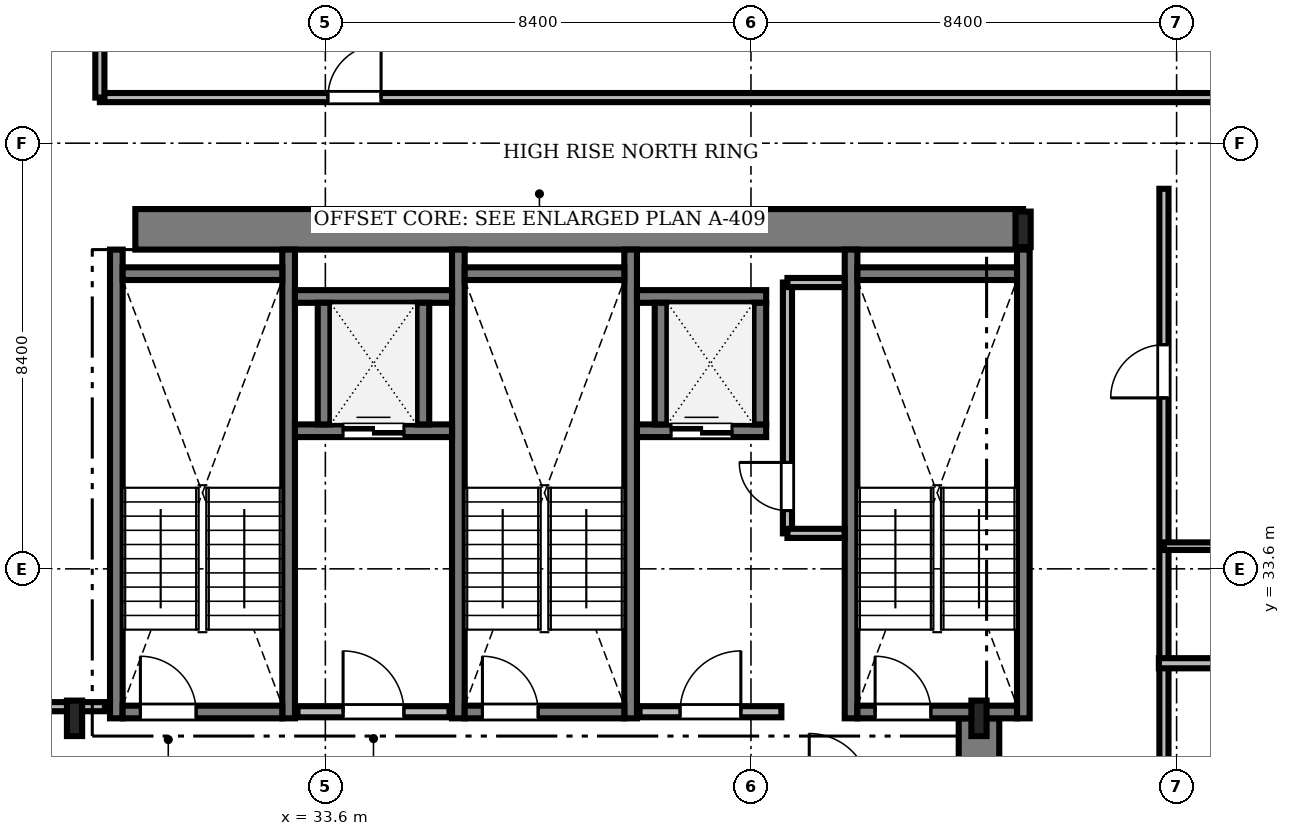
"""IFC4 building model, lengths in metres.
Left out: names, types, materials, properties, quantities, classifications, styles, units other than length and angle.
Written with IfcOpenShell. Run it as: python <this file> out.ifc"""

import sys

from ifc_helpers import new_model, si_unit, direction, frame, frame_2d, origin, origin_2d, place, context, subcontext, project, spatial, rectangle, i_section, extrude, source, transform, mapped, element, fill, save


model = new_model("IFC4")
c1 = context("Model", 3, precision=1e-05, world=origin(), true_north=direction((0.0, 1.0)))
c2 = subcontext(c1, "Body", "Model", "MODEL_VIEW")
j1 = project(units=[si_unit("LENGTHUNIT", "METRE"), si_unit("PLANEANGLEUNIT", "RADIAN")], contexts=[c1])
p1 = place(None, origin())
s1 = spatial("IfcSite", under=j1, at=p1, CompositionType="ELEMENT")
p2 = place(p1, origin())
s2 = spatial("IfcBuilding", under=s1, at=p2, CompositionType="ELEMENT")
p3 = place(p2, frame((0.0, 0.0, 203.55)))
s3 = spatial("IfcBuildingStorey", under=s2, at=p3, CompositionType="ELEMENT", Elevation=203.55)
m1 = source(origin(), c2, "Body", "SweptSolid", [
    extrude(rectangle(XDim=17.52, YDim=0.8, at=frame_2d((8.76, 0.0))), origin(), (0.0, 0.0, 1.0), 3.53),
])
p4 = place(p3, frame((29.85, 40.3, 0.0), z_axis=(0.0, 0.0, 1.0), x_axis=(1.0, 0.0, 0.0)))
e1 = element("IfcWall", 1, at=p4, inside=s3, PredefinedType="SHEAR", context=c2, shape_type="MappedRepresentation", body=[
    mapped(m1, transform((0.0, 0.0, 0.0), scale=1.0)),
])
m2 = source(origin(), c2, "Body", "SweptSolid", [
    extrude(rectangle(XDim=13.15, YDim=0.8, at=frame_2d((6.575, 0.0))), origin(), (0.0, 0.0, 1.0), 3.53),
])
p5 = place(p3, frame((46.5, 17.5, 0.0), z_axis=(0.0, 0.0, 1.0), x_axis=(0.0, 1.0, 0.0)))
e2 = element("IfcWall", 2, at=p5, inside=s3, PredefinedType="SHEAR", context=c2, shape_type="MappedRepresentation", body=[
    mapped(m2, transform((0.0, 0.0, 0.0), scale=1.0)),
])
m3 = source(origin(), c2, "Body", "SweptSolid", [
    extrude(i_section(OverallWidth=0.3, OverallDepth=0.7, WebThickness=0.017, FlangeThickness=0.032, FilletRadius=0.027, at=origin_2d()), origin(), (0.0, 0.0, 1.0), 3.53),
])
for number, where, z_axis, x_axis in (
    (3, (28.65, 30.65, 0.0), (0.0, 0.0, 1.0), (1.0, 0.0, 0.0)),
    (4, (46.5, 30.65, 0.0), (0.0, 0.0, 1.0), (1.0, 0.0, 0.0)),
    (5, (47.37, 40.3, 0.0), (0.0, 0.0, 1.0), (1.0, 0.0, 0.0)),
):
    element("IfcColumn", number, at=place(p3, frame(where, z_axis=z_axis, x_axis=x_axis)), inside=s3, PredefinedType="COLUMN", context=c2, shape_type="MappedRepresentation", body=[
        mapped(m3, transform((0.0, 0.0, 0.0), scale=1.0)),
    ])
m4 = source(origin(), c2, "Body", "SweptSolid", [
    extrude(rectangle(XDim=9.25, YDim=0.25, at=frame_2d((4.625, 0.0))), origin(), (0.0, 0.0, 1.0), 3.55),
])
for number, where, z_axis, x_axis in (
    (6, (29.475, 30.65, 0.0), (0.0, 0.0, 1.0), (0.0, 1.0, 0.0)),
    (7, (32.875, 30.65, 0.0), (0.0, 0.0, 1.0), (0.0, 1.0, 0.0)),
):
    element("IfcWall", number, at=place(p3, frame(where, z_axis=z_axis, x_axis=x_axis)), inside=s3, PredefinedType="SOLIDWALL", context=c2, shape_type="MappedRepresentation", body=[
        mapped(m4, transform((0.0, 0.0, 0.0), scale=1.0)),
    ])
m5 = source(origin(), c2, "Body", "SweptSolid", [
    extrude(rectangle(XDim=3.15, YDim=0.25, at=frame_2d((1.575, 0.0))), origin(), (0.0, 0.0, 1.0), 3.55),
])
p6 = place(p3, frame((29.6, 39.425, 0.0), z_axis=(0.0, 0.0, 1.0), x_axis=(1.0, 0.0, 0.0)))
e8 = element("IfcWall", 8, at=p6, inside=s3, PredefinedType="SOLIDWALL", context=c2, shape_type="MappedRepresentation", body=[
    mapped(m5, transform((0.0, 0.0, 0.0), scale=1.0)),
])
p7 = place(p3, frame((29.6, 30.775, 0.0), z_axis=(0.0, 0.0, 1.0), x_axis=(1.0, 0.0, 0.0)))
e9 = element("IfcWall", 9, at=p7, inside=s3, PredefinedType="SOLIDWALL", context=c2, shape_type="MappedRepresentation", body=[
    mapped(m5, transform((0.0, 0.0, 0.0), scale=1.0)),
])
m6 = source(origin(), c2, "Body", "SweptSolid", [
    extrude(rectangle(XDim=1.1, YDim=2.2, at=frame_2d((0.55, 1.1))), frame((0.0, 0.135, 0.0), z_axis=(0.0, -1.0, 0.0), x_axis=(1.0, 0.0, 0.0)), (0.0, 0.0, 1.0), 0.27),
])
p8 = place(p7, frame((0.35, 0.0, 0.0)))
e10 = element("IfcOpeningElement", 10, at=p8, cuts=e9, PredefinedType="OPENING", context=c2, shape_type="MappedRepresentation", body=[
    mapped(m6, transform((0.0, 0.0, 0.0), scale=1.0)),
])
for number, where, z_axis, x_axis in (
    (11, (36.225, 30.65, 0.0), (0.0, 0.0, 1.0), (0.0, 1.0, 0.0)),
    (12, (39.625, 30.65, 0.0), (0.0, 0.0, 1.0), (0.0, 1.0, 0.0)),
):
    element("IfcWall", number, at=place(p3, frame(where, z_axis=z_axis, x_axis=x_axis)), inside=s3, PredefinedType="SOLIDWALL", context=c2, shape_type="MappedRepresentation", body=[
        mapped(m4, transform((0.0, 0.0, 0.0), scale=1.0)),
    ])
p9 = place(p3, frame((36.35, 39.425, 0.0), z_axis=(0.0, 0.0, 1.0), x_axis=(1.0, 0.0, 0.0)))
e13 = element("IfcWall", 13, at=p9, inside=s3, PredefinedType="SOLIDWALL", context=c2, shape_type="MappedRepresentation", body=[
    mapped(m5, transform((0.0, 0.0, 0.0), scale=1.0)),
])
p10 = place(p3, frame((36.35, 30.775, 0.0), z_axis=(0.0, 0.0, 1.0), x_axis=(1.0, 0.0, 0.0)))
e14 = element("IfcWall", 14, at=p10, inside=s3, PredefinedType="SOLIDWALL", context=c2, shape_type="MappedRepresentation", body=[
    mapped(m5, transform((0.0, 0.0, 0.0), scale=1.0)),
])
p11 = place(p10, frame((0.35, 0.0, 0.0)))
e15 = element("IfcOpeningElement", 15, at=p11, cuts=e14, PredefinedType="OPENING", context=c2, shape_type="MappedRepresentation", body=[
    mapped(m6, transform((0.0, 0.0, 0.0), scale=1.0)),
])
for number, where, z_axis, x_axis in (
    (16, (43.975, 30.65, 0.0), (0.0, 0.0, 1.0), (0.0, 1.0, 0.0)),
    (17, (47.375, 30.65, 0.0), (0.0, 0.0, 1.0), (0.0, 1.0, 0.0)),
):
    element("IfcWall", number, at=place(p3, frame(where, z_axis=z_axis, x_axis=x_axis)), inside=s3, PredefinedType="SOLIDWALL", context=c2, shape_type="MappedRepresentation", body=[
        mapped(m4, transform((0.0, 0.0, 0.0), scale=1.0)),
    ])
p12 = place(p3, frame((44.1, 39.425, 0.0), z_axis=(0.0, 0.0, 1.0), x_axis=(1.0, 0.0, 0.0)))
e18 = element("IfcWall", 18, at=p12, inside=s3, PredefinedType="SOLIDWALL", context=c2, shape_type="MappedRepresentation", body=[
    mapped(m5, transform((0.0, 0.0, 0.0), scale=1.0)),
])
p13 = place(p3, frame((44.1, 30.775, 0.0), z_axis=(0.0, 0.0, 1.0), x_axis=(1.0, 0.0, 0.0)))
e19 = element("IfcWall", 19, at=p13, inside=s3, PredefinedType="SOLIDWALL", context=c2, shape_type="MappedRepresentation", body=[
    mapped(m5, transform((0.0, 0.0, 0.0), scale=1.0)),
])
p14 = place(p13, frame((0.35, 0.0, 0.0)))
e20 = element("IfcOpeningElement", 20, at=p14, cuts=e19, PredefinedType="OPENING", context=c2, shape_type="MappedRepresentation", body=[
    mapped(m6, transform((0.0, 0.0, 0.0), scale=1.0)),
])
m7 = source(origin(), c2, "Body", "SweptSolid", [
    extrude(rectangle(XDim=3.0, YDim=0.22, at=frame_2d((1.5, 0.0))), origin(), (0.0, 0.0, 1.0), 3.53),
])
p15 = place(p3, frame((33.05, 30.78, 0.0), z_axis=(0.0, 0.0, 1.0), x_axis=(1.0, 0.0, 0.0)))
e21 = element("IfcWall", 21, at=p15, inside=s3, PredefinedType="SOLIDWALL", context=c2, shape_type="MappedRepresentation", body=[
    mapped(m7, transform((0.0, 0.0, 0.0), scale=1.0)),
])
m8 = source(origin(), c2, "Body", "SweptSolid", [
    extrude(rectangle(XDim=1.2, YDim=2.2, at=frame_2d((0.6, 1.1))), frame((0.0, 0.12, 0.0), z_axis=(0.0, -1.0, 0.0), x_axis=(1.0, 0.0, 0.0)), (0.0, 0.0, 1.0), 0.24),
])
p16 = place(p15, frame((0.9, 0.0, 0.0)))
e22 = element("IfcOpeningElement", 22, at=p16, cuts=e21, PredefinedType="OPENING", context=c2, shape_type="MappedRepresentation", body=[
    mapped(m8, transform((0.0, 0.0, 0.0), scale=1.0)),
])
m9 = source(origin(), c2, "Body", "SweptSolid", [
    extrude(rectangle(XDim=2.8, YDim=0.22, at=frame_2d((1.4, 0.0))), origin(), (0.0, 0.0, 1.0), 3.53),
])
p17 = place(p3, frame((39.8, 30.78, 0.0), z_axis=(0.0, 0.0, 1.0), x_axis=(1.0, 0.0, 0.0)))
e23 = element("IfcWall", 23, at=p17, inside=s3, PredefinedType="SOLIDWALL", context=c2, shape_type="MappedRepresentation", body=[
    mapped(m9, transform((0.0, 0.0, 0.0), scale=1.0)),
])
p18 = place(p17, frame((0.8, 0.0, 0.0)))
e24 = element("IfcOpeningElement", 24, at=p18, cuts=e23, PredefinedType="OPENING", context=c2, shape_type="MappedRepresentation", body=[
    mapped(m8, transform((0.0, 0.0, 0.0), scale=1.0)),
])
m10 = source(origin(), c2, "Body", "SweptSolid", [
    extrude(rectangle(XDim=3.1, YDim=0.25, at=frame_2d((1.55, 0.0))), origin(), (0.0, 0.0, 1.0), 3.53),
])
p19 = place(p3, frame((33.0, 36.325, 0.0), z_axis=(0.0, 0.0, 1.0), x_axis=(1.0, 0.0, 0.0)))
e25 = element("IfcWall", 25, at=p19, inside=s3, PredefinedType="SOLIDWALL", context=c2, shape_type="MappedRepresentation", body=[
    mapped(m10, transform((0.0, 0.0, 0.0), scale=1.0)),
])
m11 = source(origin(), c2, "Body", "SweptSolid", [
    extrude(rectangle(XDim=1.2, YDim=2.25, at=frame_2d((0.6, 1.125))), frame((0.0, 0.135, 0.0), z_axis=(0.0, -1.0, 0.0), x_axis=(1.0, 0.0, 0.0)), (0.0, 0.0, 1.0), 0.27),
])
p20 = place(p19, frame((0.95, 0.0, 0.0)))
e26 = element("IfcOpeningElement", 26, at=p20, cuts=e25, PredefinedType="OPENING", context=c2, shape_type="MappedRepresentation", body=[
    mapped(m11, transform((0.0, 0.0, 0.0), scale=1.0)),
])
p21 = place(p3, frame((33.0, 38.975, 0.0), z_axis=(0.0, 0.0, 1.0), x_axis=(1.0, 0.0, 0.0)))
e27 = element("IfcWall", 27, at=p21, inside=s3, PredefinedType="SOLIDWALL", context=c2, shape_type="MappedRepresentation", body=[
    mapped(m10, transform((0.0, 0.0, 0.0), scale=1.0)),
])
m12 = source(origin(), c2, "Body", "SweptSolid", [
    extrude(rectangle(XDim=2.4, YDim=0.25, at=frame_2d((1.2, 0.0))), origin(), (0.0, 0.0, 1.0), 3.53),
])
for number, where, z_axis, x_axis in (
    (28, (33.575, 36.45, 0.0), (0.0, 0.0, 1.0), (0.0, 1.0, 0.0)),
    (29, (35.525, 36.45, 0.0), (0.0, 0.0, 1.0), (0.0, 1.0, 0.0)),
):
    element("IfcWall", number, at=place(p3, frame(where, z_axis=z_axis, x_axis=x_axis)), inside=s3, PredefinedType="SOLIDWALL", context=c2, shape_type="MappedRepresentation", body=[
        mapped(m12, transform((0.0, 0.0, 0.0), scale=1.0)),
    ])
m13 = source(origin(), c2, "Body", "SweptSolid", [
    extrude(rectangle(XDim=2.55, YDim=0.25, at=frame_2d((1.275, 0.0))), origin(), (0.0, 0.0, 1.0), 3.53),
])
p22 = place(p3, frame((39.75, 36.325, 0.0), z_axis=(0.0, 0.0, 1.0), x_axis=(1.0, 0.0, 0.0)))
e30 = element("IfcWall", 30, at=p22, inside=s3, PredefinedType="SOLIDWALL", context=c2, shape_type="MappedRepresentation", body=[
    mapped(m13, transform((0.0, 0.0, 0.0), scale=1.0)),
])
p23 = place(p22, frame((0.675, 0.0, 0.0)))
e31 = element("IfcOpeningElement", 31, at=p23, cuts=e30, PredefinedType="OPENING", context=c2, shape_type="MappedRepresentation", body=[
    mapped(m11, transform((0.0, 0.0, 0.0), scale=1.0)),
])
p24 = place(p3, frame((39.75, 38.975, 0.0), z_axis=(0.0, 0.0, 1.0), x_axis=(1.0, 0.0, 0.0)))
e32 = element("IfcWall", 32, at=p24, inside=s3, PredefinedType="SOLIDWALL", context=c2, shape_type="MappedRepresentation", body=[
    mapped(m13, transform((0.0, 0.0, 0.0), scale=1.0)),
])
for number, where, z_axis, x_axis in (
    (33, (40.225, 36.45, 0.0), (0.0, 0.0, 1.0), (0.0, 1.0, 0.0)),
    (34, (42.175, 36.45, 0.0), (0.0, 0.0, 1.0), (0.0, 1.0, 0.0)),
):
    element("IfcWall", number, at=place(p3, frame(where, z_axis=z_axis, x_axis=x_axis)), inside=s3, PredefinedType="SOLIDWALL", context=c2, shape_type="MappedRepresentation", body=[
        mapped(m12, transform((0.0, 0.0, 0.0), scale=1.0)),
    ])
m14 = source(origin(), c2, "Body", "SweptSolid", [
    extrude(rectangle(XDim=28.428, YDim=0.18, at=frame_2d((14.214, 0.0))), origin(), (0.0, 0.0, 1.0), 2.772),
])
p25 = place(p3, frame((29.15, 42.9, 0.0), z_axis=(0.0, 0.0, 1.0), x_axis=(1.0, 0.0, 0.0)))
e35 = element("IfcWall", 35, at=p25, inside=s3, PredefinedType="PARTITIONING", context=c2, shape_type="MappedRepresentation", body=[
    mapped(m14, transform((0.0, 0.0, 0.0), scale=1.0)),
])
m15 = source(origin(), c2, "Body", "SweptSolid", [
    extrude(rectangle(XDim=1.05, YDim=2.2, at=frame_2d((0.525, 1.1))), frame((0.0, 0.1, 0.0), z_axis=(0.0, -1.0, 0.0), x_axis=(1.0, 0.0, 0.0)), (0.0, 0.0, 1.0), 0.2),
])
p26 = place(p25, frame((4.5, 0.0, 0.0)))
e36 = element("IfcOpeningElement", 36, at=p26, cuts=e35, PredefinedType="OPENING", context=c2, shape_type="MappedRepresentation", body=[
    mapped(m15, transform((0.0, 0.0, 0.0), scale=1.0)),
])
m16 = source(origin(), c2, "Body", "SweptSolid", [
    extrude(rectangle(XDim=27.65, YDim=0.18, at=frame_2d((13.825, 0.0))), origin(), (0.0, 0.0, 1.0), 2.972),
])
p27 = place(p3, frame((50.15, 13.45, 0.0), z_axis=(0.0, 0.0, 1.0), x_axis=(0.0, 1.0, 0.0)))
e37 = element("IfcWall", 37, at=p27, inside=s3, PredefinedType="PARTITIONING", context=c2, shape_type="MappedRepresentation", body=[
    mapped(m16, transform((0.0, 0.0, 0.0), scale=1.0)),
])
p28 = place(p27, frame((5.237, 0.0, 0.0)))
e38 = element("IfcOpeningElement", 38, at=p28, cuts=e37, PredefinedType="OPENING", context=c2, shape_type="MappedRepresentation", body=[
    mapped(m15, transform((0.0, 0.0, 0.0), scale=1.0)),
])
p29 = place(p27, frame((14.38, 0.0, 0.0)))
e39 = element("IfcOpeningElement", 39, at=p29, cuts=e37, PredefinedType="OPENING", context=c2, shape_type="MappedRepresentation", body=[
    mapped(m15, transform((0.0, 0.0, 0.0), scale=1.0)),
])
p30 = place(p27, frame((23.523, 0.0, 0.0)))
e40 = element("IfcOpeningElement", 40, at=p30, cuts=e37, PredefinedType="OPENING", context=c2, shape_type="MappedRepresentation", body=[
    mapped(m15, transform((0.0, 0.0, 0.0), scale=1.0)),
])
m17 = source(origin(), c2, "Body", "SweptSolid", [
    extrude(rectangle(XDim=17.828, YDim=0.18, at=frame_2d((8.914, 0.0))), origin(), (0.0, 0.0, 1.0), 2.772),
])
p31 = place(p3, frame((11.422, 30.88, 0.0), z_axis=(0.0, 0.0, 1.0), x_axis=(1.0, 0.0, 0.0)))
e41 = element("IfcWall", 41, at=p31, inside=s3, PredefinedType="PARTITIONING", context=c2, shape_type="MappedRepresentation", body=[
    mapped(m17, transform((0.0, 0.0, 0.0), scale=1.0)),
])
p32 = place(p31, frame((10.778, 0.0, 0.0)))
e42 = element("IfcOpeningElement", 42, at=p32, cuts=e41, PredefinedType="OPENING", context=c2, shape_type="MappedRepresentation", body=[
    mapped(m15, transform((0.0, 0.0, 0.0), scale=1.0)),
])
m18 = source(origin(), c2, "Body", "SweptSolid", [
    extrude(rectangle(XDim=4.95, YDim=0.18, at=frame_2d((2.475, 0.0))), origin(), (0.0, 0.0, 1.0), 3.53),
])
p33 = place(p3, frame((42.72, 34.3, 0.0), z_axis=(0.0, 0.0, 1.0), x_axis=(0.0, 1.0, 0.0)))
e43 = element("IfcWall", 43, at=p33, inside=s3, PredefinedType="PARTITIONING", context=c2, shape_type="MappedRepresentation", body=[
    mapped(m18, transform((0.0, 0.0, 0.0), scale=1.0)),
])
m19 = source(origin(), c2, "Body", "SweptSolid", [
    extrude(rectangle(XDim=0.95, YDim=2.15, at=frame_2d((0.475, 1.075))), frame((0.0, 0.1, 0.0), z_axis=(0.0, -1.0, 0.0), x_axis=(1.0, 0.0, 0.0)), (0.0, 0.0, 1.0), 0.2),
])
p34 = place(p33, frame((0.45, 0.0, 0.0)))
e44 = element("IfcOpeningElement", 44, at=p34, cuts=e43, PredefinedType="OPENING", context=c2, shape_type="MappedRepresentation", body=[
    mapped(m19, transform((0.0, 0.0, 0.0), scale=1.0)),
])
m20 = source(origin(), c2, "Body", "SweptSolid", [
    extrude(rectangle(XDim=7.528, YDim=0.2, at=frame_2d((3.764, 0.0))), origin(), (0.0, 0.0, 1.0), 2.772),
])
p35 = place(p3, frame((50.05, 31.737, 0.0), z_axis=(0.0, 0.0, 1.0), x_axis=(1.0, 0.0, 0.0)))
e45 = element("IfcWall", 45, at=p35, inside=s3, PredefinedType="PARTITIONING", context=c2, shape_type="MappedRepresentation", body=[
    mapped(m20, transform((0.0, 0.0, 0.0), scale=1.0)),
])
m21 = source(origin(), c2, "Body", "SweptSolid", [
    extrude(rectangle(XDim=5.378, YDim=0.18, at=frame_2d((2.689, 0.0))), origin(), (0.0, 0.0, 1.0), 2.772),
])
p36 = place(p3, frame((29.15, 42.9, 0.0), z_axis=(0.0, 0.0, 1.0), x_axis=(0.0, 1.0, 0.0)))
e46 = element("IfcWall", 46, at=p36, inside=s3, PredefinedType="PARTITIONING", context=c2, shape_type="MappedRepresentation", body=[
    mapped(m21, transform((0.0, 0.0, 0.0), scale=1.0)),
])
m22 = source(origin(), c2, "Body", "SweptSolid", [
    extrude(rectangle(XDim=2.36, YDim=0.15, at=frame_2d((1.18, 0.0))), origin(), (0.0, 0.0, 1.0), 3.53),
])
p37 = place(p3, frame((50.15, 34.047, 0.0), z_axis=(0.0, 0.0, 1.0), x_axis=(1.0, 0.0, 0.0)))
e47 = element("IfcWall", 47, at=p37, inside=s3, PredefinedType="PARTITIONING", context=c2, shape_type="MappedRepresentation", body=[
    mapped(m22, transform((0.0, 0.0, 0.0), scale=1.0)),
])
m23 = source(origin(), c2, "Body", "SweptSolid", [
    extrude(rectangle(XDim=1.128, YDim=0.18, at=frame_2d((0.564, 0.0))), origin(), (0.0, 0.0, 1.0), 3.53),
])
for number, where, z_axis, x_axis in (
    (48, (42.72, 34.3, 0.0), (0.0, 0.0, 1.0), (1.0, 0.0, 0.0)),
    (49, (42.72, 39.25, 0.0), (0.0, 0.0, 1.0), (1.0, 0.0, 0.0)),
):
    element("IfcWall", number, at=place(p3, frame(where, z_axis=z_axis, x_axis=x_axis)), inside=s3, PredefinedType="PARTITIONING", context=c2, shape_type="MappedRepresentation", body=[
        mapped(m23, transform((0.0, 0.0, 0.0), scale=1.0)),
    ])
m24 = source(origin(), c2, "Body", "SweptSolid", [
    extrude(rectangle(XDim=1.1, YDim=2.2, at=frame_2d((0.55, 1.1))), frame((0.0, 0.025, 0.0), z_axis=(0.0, -1.0, 0.0), x_axis=(1.0, 0.0, 0.0)), (0.0, 0.0, 1.0), 0.05),
])
p38 = place(p8, origin())
e50 = element("IfcDoor", 50, at=p38, inside=s3, OperationType="SINGLE_SWING_LEFT", PredefinedType="DOOR", context=c2, shape_type="MappedRepresentation", body=[
    mapped(m24, transform((0.0, 0.0, 0.0), scale=1.0)),
])
fill(e10, e50)
p39 = place(p11, origin())
e51 = element("IfcDoor", 51, at=p39, inside=s3, OperationType="SINGLE_SWING_LEFT", PredefinedType="DOOR", context=c2, shape_type="MappedRepresentation", body=[
    mapped(m24, transform((0.0, 0.0, 0.0), scale=1.0)),
])
fill(e15, e51)
p40 = place(p14, origin())
e52 = element("IfcDoor", 52, at=p40, inside=s3, OperationType="SINGLE_SWING_LEFT", PredefinedType="DOOR", context=c2, shape_type="MappedRepresentation", body=[
    mapped(m24, transform((0.0, 0.0, 0.0), scale=1.0)),
])
fill(e20, e52)
m25 = source(origin(), c2, "Body", "SweptSolid", [
    extrude(rectangle(XDim=1.2, YDim=2.2, at=frame_2d((0.6, 1.1))), frame((0.0, 0.025, 0.0), z_axis=(0.0, -1.0, 0.0), x_axis=(1.0, 0.0, 0.0)), (0.0, 0.0, 1.0), 0.05),
])
p41 = place(p16, origin())
e53 = element("IfcDoor", 53, at=p41, inside=s3, OperationType="SINGLE_SWING_LEFT", PredefinedType="DOOR", context=c2, shape_type="MappedRepresentation", body=[
    mapped(m25, transform((0.0, 0.0, 0.0), scale=1.0)),
])
fill(e22, e53)
p42 = place(p18, origin())
e54 = element("IfcDoor", 54, at=p42, inside=s3, OperationType="SINGLE_SWING_RIGHT", PredefinedType="DOOR", context=c2, shape_type="MappedRepresentation", body=[
    mapped(m25, transform((0.0, 0.0, 0.0), scale=1.0)),
])
fill(e24, e54)
m26 = source(origin(), c2, "Body", "SweptSolid", [
    extrude(rectangle(XDim=1.2, YDim=2.25, at=frame_2d((0.6, 1.125))), frame((0.0, 0.025, 0.0), z_axis=(0.0, -1.0, 0.0), x_axis=(1.0, 0.0, 0.0)), (0.0, 0.0, 1.0), 0.05),
])
p43 = place(p20, origin())
e55 = element("IfcDoor", 55, at=p43, inside=s3, OperationType="DOUBLE_DOOR_SLIDING", PredefinedType="DOOR", context=c2, shape_type="MappedRepresentation", body=[
    mapped(m26, transform((0.0, 0.0, 0.0), scale=1.0)),
])
fill(e26, e55)
p44 = place(p23, origin())
e56 = element("IfcDoor", 56, at=p44, inside=s3, OperationType="DOUBLE_DOOR_SLIDING", PredefinedType="DOOR", context=c2, shape_type="MappedRepresentation", body=[
    mapped(m26, transform((0.0, 0.0, 0.0), scale=1.0)),
])
fill(e31, e56)
m27 = source(origin(), c2, "Body", "SweptSolid", [
    extrude(rectangle(XDim=1.05, YDim=2.2, at=frame_2d((0.525, 1.1))), frame((0.0, 0.025, 0.0), z_axis=(0.0, -1.0, 0.0), x_axis=(1.0, 0.0, 0.0)), (0.0, 0.0, 1.0), 0.05),
])
p45 = place(p26, origin())
e57 = element("IfcDoor", 57, at=p45, inside=s3, OperationType="SINGLE_SWING_RIGHT", PredefinedType="DOOR", context=c2, shape_type="MappedRepresentation", body=[
    mapped(m27, transform((0.0, 0.0, 0.0), scale=1.0)),
])
fill(e36, e57)
p46 = place(p30, origin())
e58 = element("IfcDoor", 58, at=p46, inside=s3, OperationType="SINGLE_SWING_LEFT", PredefinedType="DOOR", context=c2, shape_type="MappedRepresentation", body=[
    mapped(m27, transform((0.0, 0.0, 0.0), scale=1.0)),
])
fill(e40, e58)
m28 = source(origin(), c2, "Body", "SweptSolid", [
    extrude(rectangle(XDim=0.95, YDim=2.15, at=frame_2d((0.475, 1.075))), frame((0.0, 0.025, 0.0), z_axis=(0.0, -1.0, 0.0), x_axis=(1.0, 0.0, 0.0)), (0.0, 0.0, 1.0), 0.05),
])
p47 = place(p34, origin())
e59 = element("IfcDoor", 59, at=p47, inside=s3, OperationType="SINGLE_SWING_RIGHT", PredefinedType="DOOR", context=c2, shape_type="MappedRepresentation", body=[
    mapped(m28, transform((0.0, 0.0, 0.0), scale=1.0)),
])
fill(e44, e59)
save(model, sys.argv[1])
